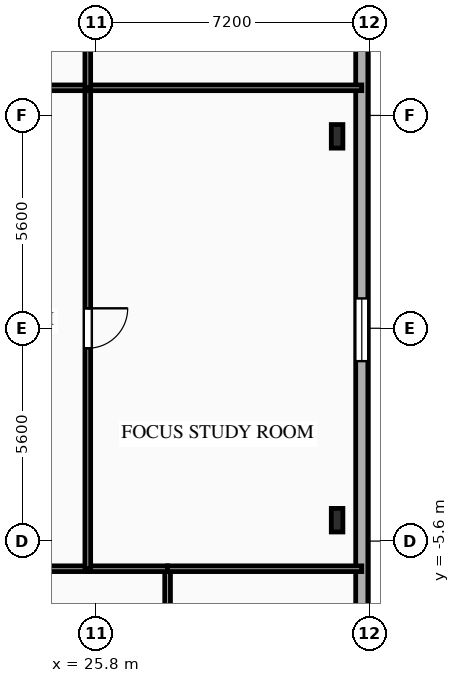
"""IFC4 building model, lengths in metres.
Left out: names, types, materials, properties, quantities, classifications, styles, units other than length and angle.
Written with IfcOpenShell. Run it as: python <this file> out.ifc"""

import sys

from ifc_helpers import new_model, si_unit, direction, frame, frame_2d, origin, origin_2d, place, context, subcontext, project, spatial, rectangle, i_section, extrude, element, fill, save


model = new_model("IFC4")
c1 = context("Model", 3, precision=1e-05, world=origin(), true_north=direction((0.0, 1.0)))
c2 = subcontext(c1, "Body", "Model", "MODEL_VIEW")
j1 = project(units=[si_unit("LENGTHUNIT", "METRE"), si_unit("PLANEANGLEUNIT", "RADIAN")], contexts=[c1])
p1 = place(None, origin())
s1 = spatial("IfcSite", under=j1, at=p1, CompositionType="ELEMENT")
p2 = place(p1, origin())
s2 = spatial("IfcBuilding", under=s1, at=p2, CompositionType="ELEMENT")
p3 = place(p2, frame((0.0, 0.0, 37.05)))
s3 = spatial("IfcBuildingStorey", under=s2, at=p3, CompositionType="ELEMENT", Elevation=37.05)
for number, where, z_axis, x_axis in (
    (1, (32.15, -5.05, 0.0), (0.0, 0.0, 1.0), (1.0, 0.0, 0.0)),
    (2, (32.15, 5.05, 0.0), (0.0, 0.0, 1.0), (1.0, 0.0, 0.0)),
):
    element("IfcColumn", number, at=place(p3, frame(where, z_axis=z_axis, x_axis=x_axis)), inside=s3, PredefinedType="COLUMN", context=c2, shape_type="SweptSolid", body=[
        extrude(i_section(OverallWidth=0.305, OverallDepth=0.62, WebThickness=0.021, FlangeThickness=0.04, FilletRadius=0.027, at=origin_2d()), origin(), (0.0, 0.0, 1.0), 3.35),
    ])
p4 = place(p3, frame((32.8, 15.8, 0.0), z_axis=(0.0, 0.0, 1.0), x_axis=(0.0, -1.0, 0.0)))
e3 = element("IfcWall", 3, at=p4, inside=s3, PredefinedType="SOLIDWALL", context=c2, shape_type="SweptSolid", body=[
    extrude(rectangle(XDim=31.6, YDim=0.32, at=frame_2d((15.8, 0.0))), origin(), (0.0, 0.0, 1.0), 3.035),
])
p5 = place(p4, frame((4.175, 0.0, 0.85)))
e4 = element("IfcOpeningElement", 4, at=p5, cuts=e3, PredefinedType="OPENING", context=c2, shape_type="SweptSolid", body=[
    extrude(rectangle(XDim=1.65, YDim=1.85, at=frame_2d((0.825, 0.925))), frame((0.0, 0.17, 0.0), z_axis=(0.0, -1.0, 0.0), x_axis=(1.0, 0.0, 0.0)), (0.0, 0.0, 1.0), 0.34),
])
p6 = place(p4, frame((15.015, 0.0, 0.85)))
e5 = element("IfcOpeningElement", 5, at=p6, cuts=e3, PredefinedType="OPENING", context=c2, shape_type="SweptSolid", body=[
    extrude(rectangle(XDim=1.65, YDim=1.85, at=frame_2d((0.825, 0.925))), frame((0.0, 0.17, 0.0), z_axis=(0.0, -1.0, 0.0), x_axis=(1.0, 0.0, 0.0)), (0.0, 0.0, 1.0), 0.34),
])
p7 = place(p4, frame((25.855, 0.0, 0.85)))
e6 = element("IfcOpeningElement", 6, at=p7, cuts=e3, PredefinedType="OPENING", context=c2, shape_type="SweptSolid", body=[
    extrude(rectangle(XDim=1.65, YDim=1.85, at=frame_2d((0.825, 0.925))), frame((0.0, 0.17, 0.0), z_axis=(0.0, -1.0, 0.0), x_axis=(1.0, 0.0, 0.0)), (0.0, 0.0, 1.0), 0.34),
])
p8 = place(p3, frame((27.69, -6.327, 0.0), z_axis=(0.0, 0.0, 1.0), x_axis=(0.0, -1.0, 0.0)))
e7 = element("IfcWall", 7, at=p8, inside=s3, PredefinedType="PARTITIONING", context=c2, shape_type="SweptSolid", body=[
    extrude(rectangle(XDim=13.073, YDim=0.15, at=frame_2d((6.537, 0.0))), origin(), (0.0, 0.0, 1.0), 3.035),
])
p9 = place(p8, frame((3.296, 0.0, 0.0)))
e8 = element("IfcOpeningElement", 8, at=p9, cuts=e7, PredefinedType="OPENING", context=c2, shape_type="SweptSolid", body=[
    extrude(rectangle(XDim=1.05, YDim=2.15, at=frame_2d((0.525, 1.075))), frame((0.0, 0.085, 0.0), z_axis=(0.0, -1.0, 0.0), x_axis=(1.0, 0.0, 0.0)), (0.0, 0.0, 1.0), 0.17),
])
p10 = place(p3, frame((23.0, -6.327, 0.0), z_axis=(0.0, 0.0, 1.0), x_axis=(1.0, 0.0, 0.0)))
e9 = element("IfcWall", 9, at=p10, inside=s3, PredefinedType="PARTITIONING", context=c2, shape_type="SweptSolid", body=[
    extrude(rectangle(XDim=2.59, YDim=0.15, at=frame_2d((1.295, 0.0))), origin(), (0.0, 0.0, 1.0), 3.035),
])
p11 = place(p3, frame((25.59, -6.327, 0.0), z_axis=(0.0, 0.0, 1.0), x_axis=(1.0, 0.0, 0.0)))
e10 = element("IfcWall", 10, at=p11, inside=s3, PredefinedType="PARTITIONING", context=c2, shape_type="SweptSolid", body=[
    extrude(rectangle(XDim=2.1, YDim=0.15, at=frame_2d((1.05, 0.0))), origin(), (0.0, 0.0, 1.0), 3.035),
])
p12 = place(p3, frame((27.69, -6.327, 0.0), z_axis=(0.0, 0.0, 1.0), x_axis=(1.0, 0.0, 0.0)))
e11 = element("IfcWall", 11, at=p12, inside=s3, PredefinedType="PARTITIONING", context=c2, shape_type="SweptSolid", body=[
    extrude(rectangle(XDim=5.11, YDim=0.15, at=frame_2d((2.555, 0.0))), origin(), (0.0, 0.0, 1.0), 3.035),
])
p13 = place(p3, frame((25.59, 6.327, 0.0), z_axis=(0.0, 0.0, 1.0), x_axis=(0.0, -1.0, 0.0)))
e12 = element("IfcWall", 12, at=p13, inside=s3, PredefinedType="PARTITIONING", context=c2, shape_type="SweptSolid", body=[
    extrude(rectangle(XDim=12.654, YDim=0.15, at=frame_2d((6.327, 0.0))), origin(), (0.0, 0.0, 1.0), 2.69),
])
p14 = place(p13, frame((5.802, 0.0, 0.0)))
e13 = element("IfcOpeningElement", 13, at=p14, cuts=e12, PredefinedType="OPENING", context=c2, shape_type="SweptSolid", body=[
    extrude(rectangle(XDim=1.05, YDim=2.15, at=frame_2d((0.525, 1.075))), frame((0.0, 0.085, 0.0), z_axis=(0.0, -1.0, 0.0), x_axis=(1.0, 0.0, 0.0)), (0.0, 0.0, 1.0), 0.17),
])
p15 = place(p3, frame((18.8, 6.327, 0.0), z_axis=(0.0, 0.0, 1.0), x_axis=(1.0, 0.0, 0.0)))
e14 = element("IfcWall", 14, at=p15, inside=s3, PredefinedType="PARTITIONING", context=c2, shape_type="SweptSolid", body=[
    extrude(rectangle(XDim=6.79, YDim=0.15, at=frame_2d((3.395, 0.0))), origin(), (0.0, 0.0, 1.0), 3.035),
])
p16 = place(p3, frame((25.59, 6.327, 0.0), z_axis=(0.0, 0.0, 1.0), x_axis=(1.0, 0.0, 0.0)))
e15 = element("IfcWall", 15, at=p16, inside=s3, PredefinedType="PARTITIONING", context=c2, shape_type="SweptSolid", body=[
    extrude(rectangle(XDim=7.21, YDim=0.15, at=frame_2d((3.605, 0.0))), origin(), (0.0, 0.0, 1.0), 3.035),
])
p17 = place(p3, frame((25.59, 19.4, 0.0), z_axis=(0.0, 0.0, 1.0), x_axis=(0.0, -1.0, 0.0)))
e16 = element("IfcWall", 16, at=p17, inside=s3, PredefinedType="PARTITIONING", context=c2, shape_type="SweptSolid", body=[
    extrude(rectangle(XDim=13.073, YDim=0.15, at=frame_2d((6.537, 0.0))), origin(), (0.0, 0.0, 1.0), 2.69),
])
p18 = place(p17, frame((8.727, 0.0, 0.0)))
e17 = element("IfcOpeningElement", 17, at=p18, cuts=e16, PredefinedType="OPENING", context=c2, shape_type="SweptSolid", body=[
    extrude(rectangle(XDim=1.05, YDim=2.15, at=frame_2d((0.525, 1.075))), frame((0.0, 0.085, 0.0), z_axis=(0.0, -1.0, 0.0), x_axis=(1.0, 0.0, 0.0)), (0.0, 0.0, 1.0), 0.17),
])
p19 = place(p6, origin())
e18 = element("IfcWindow", 18, at=p19, inside=s3, PartitioningType="SINGLE_PANEL", PredefinedType="WINDOW", context=c2, shape_type="SweptSolid", body=[
    extrude(rectangle(XDim=1.65, YDim=1.85, at=frame_2d((0.825, 0.925))), frame((0.0, 0.03, 0.0), z_axis=(0.0, -1.0, 0.0), x_axis=(1.0, 0.0, 0.0)), (0.0, 0.0, 1.0), 0.06),
])
fill(e5, e18)
p20 = place(p14, origin())
e19 = element("IfcDoor", 19, at=p20, inside=s3, OperationType="SINGLE_SWING_LEFT", PredefinedType="DOOR", context=c2, shape_type="SweptSolid", body=[
    extrude(rectangle(XDim=1.05, YDim=2.15, at=frame_2d((0.525, 1.075))), frame((0.0, 0.025, 0.0), z_axis=(0.0, -1.0, 0.0), x_axis=(1.0, 0.0, 0.0)), (0.0, 0.0, 1.0), 0.05),
])
fill(e13, e19)
save(model, sys.argv[1])
